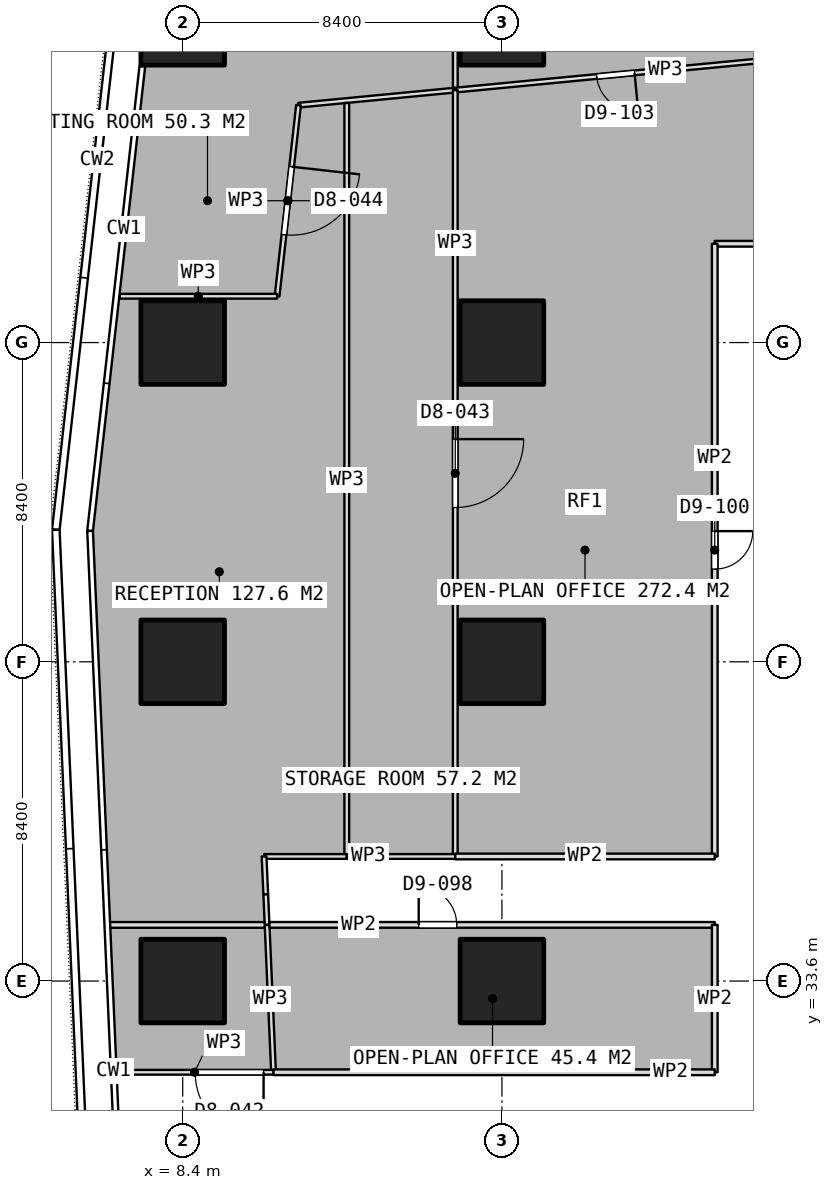
"""IFC4 building model, lengths in metres.
Left out: names, types, materials, properties, quantities, classifications, styles, units other than length and angle.
Written with IfcOpenShell. Run it as: python <this file> out.ifc"""

import sys

from ifc_helpers import new_model, si_unit, direction, frame, frame_2d, origin, origin_2d, place, context, subcontext, project, spatial, rectangle, extrude, element, fill, save


model = new_model("IFC4")
c1 = context("Model", 3, precision=1e-05, world=origin(), true_north=direction((0.0, 1.0)))
c2 = subcontext(c1, "Body", "Model", "MODEL_VIEW")
j1 = project(units=[si_unit("LENGTHUNIT", "METRE"), si_unit("PLANEANGLEUNIT", "RADIAN")], contexts=[c1])
p1 = place(None, origin())
s1 = spatial("IfcSite", under=j1, at=p1, CompositionType="ELEMENT")
p2 = place(p1, origin())
s2 = spatial("IfcBuilding", under=s1, at=p2, CompositionType="ELEMENT")
p3 = place(p2, frame((0.0, 0.0, 40.4)))
s3 = spatial("IfcBuildingStorey", under=s2, at=p3, CompositionType="ELEMENT", Elevation=40.4)
for number, where, z_axis, x_axis in (
    (1, (8.4, 33.6, 0.0), (0.0, 0.0, 1.0), (1.0, 0.0, 0.0)),
    (2, (8.4, 42.0, 0.0), (0.0, 0.0, 1.0), (1.0, 0.0, 0.0)),
    (3, (8.4, 50.4, 0.0), (0.0, 0.0, 1.0), (1.0, 0.0, 0.0)),
    (4, (8.4, 58.8, 0.0), (0.0, 0.0, 1.0), (1.0, 0.0, 0.0)),
    (5, (16.8, 33.6, 0.0), (0.0, 0.0, 1.0), (1.0, 0.0, 0.0)),
    (6, (16.8, 42.0, 0.0), (0.0, 0.0, 1.0), (1.0, 0.0, 0.0)),
    (7, (16.8, 50.4, 0.0), (0.0, 0.0, 1.0), (1.0, 0.0, 0.0)),
    (8, (16.8, 58.8, 0.0), (0.0, 0.0, 1.0), (1.0, 0.0, 0.0)),
):
    element("IfcColumn", number, at=place(p3, frame(where, z_axis=z_axis, x_axis=x_axis)), inside=s3, PredefinedType="COLUMN", context=c2, shape_type="SweptSolid", body=[
        extrude(rectangle(XDim=2.2, YDim=2.2, at=origin_2d()), origin(), (0.0, 0.0, 1.0), 3.75),
    ])
p4 = place(p3, frame((15.573, 57.043, 0.0), z_axis=(0.0, 0.0, 1.0), x_axis=(0.0, 1.0, 0.0)))
e9 = element("IfcWall", 9, at=p4, inside=s3, PredefinedType="PARTITIONING", context=c2, shape_type="SweptSolid", body=[
    extrude(rectangle(XDim=4.139, YDim=0.125, at=frame_2d((2.069, 0.0))), origin(), (0.0, 0.0, 1.0), 3.5),
])
p5 = place(p3, frame((24.08, 57.861, 0.0), z_axis=(0.0, 0.0, 1.0), x_axis=(-0.995407615834, -0.095727103477, 0.0)))
e10 = element("IfcWall", 10, at=p5, inside=s3, PredefinedType="PARTITIONING", context=c2, shape_type="SweptSolid", body=[
    extrude(rectangle(XDim=8.546, YDim=0.125, at=frame_2d((4.273, 0.0))), origin(), (0.0, 0.0, 1.0), 3.5),
])
p6 = place(p5, frame((3.808, 0.0, 0.0)))
e11 = element("IfcOpeningElement", 11, at=p6, cuts=e10, PredefinedType="OPENING", context=c2, shape_type="SweptSolid", body=[
    extrude(rectangle(XDim=1.0, YDim=2.1, at=frame_2d((0.5, 1.05))), frame((0.0, 0.073, 0.0), z_axis=(0.0, -1.0, 0.0), x_axis=(1.0, 0.0, 0.0)), (0.0, 0.0, 1.0), 0.145),
])
p7 = place(p3, frame((15.572, 57.043, 0.0), z_axis=(0.0, 0.0, 1.0), x_axis=(-0.995399090968, -0.095815706957, 0.0)))
e12 = element("IfcWall", 12, at=p7, inside=s3, PredefinedType="PARTITIONING", context=c2, shape_type="SweptSolid", body=[
    extrude(rectangle(XDim=4.143, YDim=0.125, at=frame_2d((2.072, 0.0))), origin(), (0.0, 0.0, 1.0), 3.5),
])
p8 = place(p3, frame((11.448, 56.646, 0.0), z_axis=(0.0, 0.0, 1.0), x_axis=(-0.111676223133, -0.993744645866, 0.0)))
e13 = element("IfcWall", 13, at=p8, inside=s3, PredefinedType="PARTITIONING", context=c2, shape_type="SweptSolid", body=[
    extrude(rectangle(XDim=5.059, YDim=0.125, at=frame_2d((2.529, 0.0))), origin(), (0.0, 0.0, 1.0), 3.5),
])
p9 = place(p8, frame((1.629, 0.0, 0.0)))
e14 = element("IfcOpeningElement", 14, at=p9, cuts=e13, PredefinedType="OPENING", context=c2, shape_type="SweptSolid", body=[
    extrude(rectangle(XDim=1.8, YDim=2.1, at=frame_2d((0.9, 1.05))), frame((0.0, 0.073, 0.0), z_axis=(0.0, -1.0, 0.0), x_axis=(1.0, 0.0, 0.0)), (0.0, 0.0, 1.0), 0.145),
])
p10 = place(p3, frame((10.883, 51.619, 0.0), z_axis=(0.0, 0.0, 1.0), x_axis=(-1.0, 0.0, 0.0)))
e15 = element("IfcWall", 15, at=p10, inside=s3, PredefinedType="PARTITIONING", context=c2, shape_type="SweptSolid", body=[
    extrude(rectangle(XDim=4.146, YDim=0.125, at=frame_2d((2.073, 0.0))), origin(), (0.0, 0.0, 1.0), 3.5),
])
p11 = place(p3, frame((12.717, 56.705, 0.0), z_axis=(0.0, 0.0, 1.0), x_axis=(0.0, -1.0, 0.0)))
e16 = element("IfcWall", 16, at=p11, inside=s3, PredefinedType="PARTITIONING", context=c2, shape_type="SweptSolid", body=[
    extrude(rectangle(XDim=19.827, YDim=0.125, at=frame_2d((9.914, 0.0))), origin(), (0.0, 0.0, 1.0), 3.5),
])
p12 = place(p3, frame((12.717, 36.878, 0.0), z_axis=(0.0, 0.0, 1.0), x_axis=(-1.0, 0.0, 0.0)))
e17 = element("IfcWall", 17, at=p12, inside=s3, PredefinedType="PARTITIONING", context=c2, shape_type="SweptSolid", body=[
    extrude(rectangle(XDim=2.176, YDim=0.125, at=frame_2d((1.088, 0.0))), origin(), (0.0, 0.0, 1.0), 3.5),
])
p13 = place(p3, frame((10.541, 36.878, 0.0), z_axis=(0.0, 0.0, 1.0), x_axis=(0.0440424538, -0.999029660352, 0.0)))
e18 = element("IfcWall", 18, at=p13, inside=s3, PredefinedType="PARTITIONING", context=c2, shape_type="SweptSolid", body=[
    extrude(rectangle(XDim=0.998, YDim=0.125, at=frame_2d((0.499, 0.0))), origin(), (0.0, 0.0, 1.0), 3.5),
])
p14 = place(p3, frame((10.585, 35.881, 0.0), z_axis=(0.0, 0.0, 1.0), x_axis=(0.043793560627, -0.999040601801, 0.0)))
e19 = element("IfcWall", 19, at=p14, inside=s3, PredefinedType="PARTITIONING", context=c2, shape_type="SweptSolid", body=[
    extrude(rectangle(XDim=0.803, YDim=0.125, at=frame_2d((0.401, 0.0))), origin(), (0.0, 0.0, 1.0), 3.5),
])
p15 = place(p3, frame((10.62, 35.079, 0.0), z_axis=(0.0, 0.0, 1.0), x_axis=(0.043761924835, -0.999041988074, 0.0)))
e20 = element("IfcWall", 20, at=p15, inside=s3, PredefinedType="PARTITIONING", context=c2, shape_type="SweptSolid", body=[
    extrude(rectangle(XDim=3.883, YDim=0.125, at=frame_2d((1.941, 0.0))), origin(), (0.0, 0.0, 1.0), 3.5),
])
p16 = place(p3, frame((10.79, 31.2, 0.0), z_axis=(0.0, 0.0, 1.0), x_axis=(-1.0, 0.0, 0.0)))
e21 = element("IfcWall", 21, at=p16, inside=s3, PredefinedType="PARTITIONING", context=c2, shape_type="SweptSolid", body=[
    extrude(rectangle(XDim=4.155, YDim=0.125, at=frame_2d((2.078, 0.0))), origin(), (0.0, 0.0, 1.0), 3.5),
])
p17 = place(p16, frame((0.262, 0.0, 0.0)))
e22 = element("IfcOpeningElement", 22, at=p17, cuts=e21, PredefinedType="OPENING", context=c2, shape_type="SweptSolid", body=[
    extrude(rectangle(XDim=1.8, YDim=2.1, at=frame_2d((0.9, 1.05))), frame((0.0, 0.073, 0.0), z_axis=(0.0, -1.0, 0.0), x_axis=(1.0, 0.0, 0.0)), (0.0, 0.0, 1.0), 0.145),
])
p18 = place(p3, frame((15.572, 57.043, 0.0), z_axis=(0.0, 0.0, 1.0), x_axis=(0.0, -1.0, 0.0)))
e23 = element("IfcWall", 23, at=p18, inside=s3, PredefinedType="PARTITIONING", context=c2, shape_type="SweptSolid", body=[
    extrude(rectangle(XDim=20.165, YDim=0.125, at=frame_2d((10.083, 0.0))), origin(), (0.0, 0.0, 1.0), 3.5),
])
p19 = place(p18, frame((9.183, 0.0, 0.0)))
e24 = element("IfcOpeningElement", 24, at=p19, cuts=e23, PredefinedType="OPENING", context=c2, shape_type="SweptSolid", body=[
    extrude(rectangle(XDim=1.8, YDim=2.1, at=frame_2d((0.9, 1.05))), frame((0.0, 0.073, 0.0), z_axis=(0.0, -1.0, 0.0), x_axis=(1.0, 0.0, 0.0)), (0.0, 0.0, 1.0), 0.145),
])
p20 = place(p3, frame((15.572, 36.878, 0.0), z_axis=(0.0, 0.0, 1.0), x_axis=(-1.0, 0.0, 0.0)))
e25 = element("IfcWall", 25, at=p20, inside=s3, PredefinedType="PARTITIONING", context=c2, shape_type="SweptSolid", body=[
    extrude(rectangle(XDim=2.855, YDim=0.125, at=frame_2d((1.427, 0.0))), origin(), (0.0, 0.0, 1.0), 3.5),
])
p21 = place(p3, frame((36.3, 53.0, 0.0), z_axis=(0.0, 0.0, 1.0), x_axis=(-1.0, 0.0, 0.0)))
e26 = element("IfcWall", 26, at=p21, inside=s3, PredefinedType="PARTITIONING", context=c2, shape_type="SweptSolid", body=[
    extrude(rectangle(XDim=13.9, YDim=0.15, at=frame_2d((6.95, 0.0))), origin(), (0.0, 0.0, 1.0), 3.5),
])
p22 = place(p3, frame((22.4, 53.0, 0.0), z_axis=(0.0, 0.0, 1.0), x_axis=(0.0, -1.0, 0.0)))
e27 = element("IfcWall", 27, at=p22, inside=s3, PredefinedType="PARTITIONING", context=c2, shape_type="SweptSolid", body=[
    extrude(rectangle(XDim=16.122, YDim=0.15, at=frame_2d((8.061, 0.0))), origin(), (0.0, 0.0, 1.0), 3.5),
])
p23 = place(p22, frame((7.561, 0.0, 0.0)))
e28 = element("IfcOpeningElement", 28, at=p23, cuts=e27, PredefinedType="OPENING", context=c2, shape_type="SweptSolid", body=[
    extrude(rectangle(XDim=1.0, YDim=2.1, at=frame_2d((0.5, 1.05))), frame((0.0, 0.085, 0.0), z_axis=(0.0, -1.0, 0.0), x_axis=(1.0, 0.0, 0.0)), (0.0, 0.0, 1.0), 0.17),
])
p24 = place(p3, frame((22.4, 36.878, 0.0), z_axis=(0.0, 0.0, 1.0), x_axis=(-1.0, 0.0, 0.0)))
e29 = element("IfcWall", 29, at=p24, inside=s3, PredefinedType="PARTITIONING", context=c2, shape_type="SweptSolid", body=[
    extrude(rectangle(XDim=6.828, YDim=0.15, at=frame_2d((3.414, 0.0))), origin(), (0.0, 0.0, 1.0), 3.5),
])
p25 = place(p3, frame((10.683, 35.078, 0.0), z_axis=(0.0, 0.0, 1.0), x_axis=(1.0, 0.0, 0.0)))
e30 = element("IfcWall", 30, at=p25, inside=s3, PredefinedType="PARTITIONING", context=c2, shape_type="SweptSolid", body=[
    extrude(rectangle(XDim=11.717, YDim=0.15, at=frame_2d((5.858, 0.0))), origin(), (0.0, 0.0, 1.0), 3.5),
])
p26 = place(p25, frame((3.927, 0.0, 0.0)))
e31 = element("IfcOpeningElement", 31, at=p26, cuts=e30, PredefinedType="OPENING", context=c2, shape_type="SweptSolid", body=[
    extrude(rectangle(XDim=1.0, YDim=2.1, at=frame_2d((0.5, 1.05))), frame((0.0, 0.085, 0.0), z_axis=(0.0, -1.0, 0.0), x_axis=(1.0, 0.0, 0.0)), (0.0, 0.0, 1.0), 0.17),
])
p27 = place(p3, frame((22.4, 35.078, 0.0), z_axis=(0.0, 0.0, 1.0), x_axis=(0.0, -1.0, 0.0)))
e32 = element("IfcWall", 32, at=p27, inside=s3, PredefinedType="PARTITIONING", context=c2, shape_type="SweptSolid", body=[
    extrude(rectangle(XDim=3.878, YDim=0.15, at=frame_2d((1.939, 0.0))), origin(), (0.0, 0.0, 1.0), 3.5),
])
p28 = place(p3, frame((22.4, 31.2, 0.0), z_axis=(0.0, 0.0, 1.0), x_axis=(-1.0, 0.0, 0.0)))
e33 = element("IfcWall", 33, at=p28, inside=s3, PredefinedType="PARTITIONING", context=c2, shape_type="SweptSolid", body=[
    extrude(rectangle(XDim=11.61, YDim=0.15, at=frame_2d((5.805, 0.0))), origin(), (0.0, 0.0, 1.0), 3.5),
])
p29 = place(p3, frame((10.558, 35.077, 0.0), z_axis=(0.0, 0.0, 1.0), x_axis=(-1.0, 0.0, 0.0)))
e34 = element("IfcWall", 34, at=p29, inside=s3, PredefinedType="PARTITIONING", context=c2, shape_type="SweptSolid", body=[
    extrude(rectangle(XDim=4.092, YDim=0.15, at=frame_2d((2.046, 0.0))), origin(), (0.0, 0.0, 1.0), 3.5),
])
p30 = place(p6, origin())
e35 = element("IfcDoor", 35, at=p30, inside=s3, OperationType="SINGLE_SWING_LEFT", PredefinedType="DOOR", context=c2, shape_type="SweptSolid", body=[
    extrude(rectangle(XDim=1.0, YDim=2.1, at=frame_2d((0.5, 1.05))), frame((0.0, 0.025, 0.0), z_axis=(0.0, -1.0, 0.0), x_axis=(1.0, 0.0, 0.0)), (0.0, 0.0, 1.0), 0.05),
])
fill(e11, e35)
p31 = place(p17, origin())
e36 = element("IfcDoor", 36, at=p31, inside=s3, OperationType="DOUBLE_DOOR_SINGLE_SWING", PredefinedType="DOOR", context=c2, shape_type="SweptSolid", body=[
    extrude(rectangle(XDim=1.8, YDim=2.1, at=frame_2d((0.9, 1.05))), frame((0.0, 0.025, 0.0), z_axis=(0.0, -1.0, 0.0), x_axis=(1.0, 0.0, 0.0)), (0.0, 0.0, 1.0), 0.05),
])
fill(e22, e36)
p32 = place(p19, origin())
e37 = element("IfcDoor", 37, at=p32, inside=s3, OperationType="DOUBLE_DOOR_SINGLE_SWING", PredefinedType="DOOR", context=c2, shape_type="SweptSolid", body=[
    extrude(rectangle(XDim=1.8, YDim=2.1, at=frame_2d((0.9, 1.05))), frame((0.0, 0.025, 0.0), z_axis=(0.0, -1.0, 0.0), x_axis=(1.0, 0.0, 0.0)), (0.0, 0.0, 1.0), 0.05),
])
fill(e24, e37)
p33 = place(p23, origin())
e38 = element("IfcDoor", 38, at=p33, inside=s3, OperationType="SINGLE_SWING_LEFT", PredefinedType="DOOR", context=c2, shape_type="SweptSolid", body=[
    extrude(rectangle(XDim=1.0, YDim=2.1, at=frame_2d((0.5, 1.05))), frame((0.0, 0.025, 0.0), z_axis=(0.0, -1.0, 0.0), x_axis=(1.0, 0.0, 0.0)), (0.0, 0.0, 1.0), 0.05),
])
fill(e28, e38)
p34 = place(p26, origin())
e39 = element("IfcDoor", 39, at=p34, inside=s3, OperationType="SINGLE_SWING_LEFT", PredefinedType="DOOR", context=c2, shape_type="SweptSolid", body=[
    extrude(rectangle(XDim=1.0, YDim=2.1, at=frame_2d((0.5, 1.05))), frame((0.0, 0.025, 0.0), z_axis=(0.0, -1.0, 0.0), x_axis=(1.0, 0.0, 0.0)), (0.0, 0.0, 1.0), 0.05),
])
fill(e31, e39)
p35 = place(p9, origin())
e40 = element("IfcDoor", 40, at=p35, inside=s3, OperationType="DOUBLE_DOOR_SINGLE_SWING", PredefinedType="DOOR", context=c2, shape_type="SweptSolid", body=[
    extrude(rectangle(XDim=1.8, YDim=2.1, at=frame_2d((0.9, 1.05))), frame((0.0, 0.025, 0.0), z_axis=(0.0, -1.0, 0.0), x_axis=(1.0, 0.0, 0.0)), (0.0, 0.0, 1.0), 0.05),
])
fill(e14, e40)
save(model, sys.argv[1])
